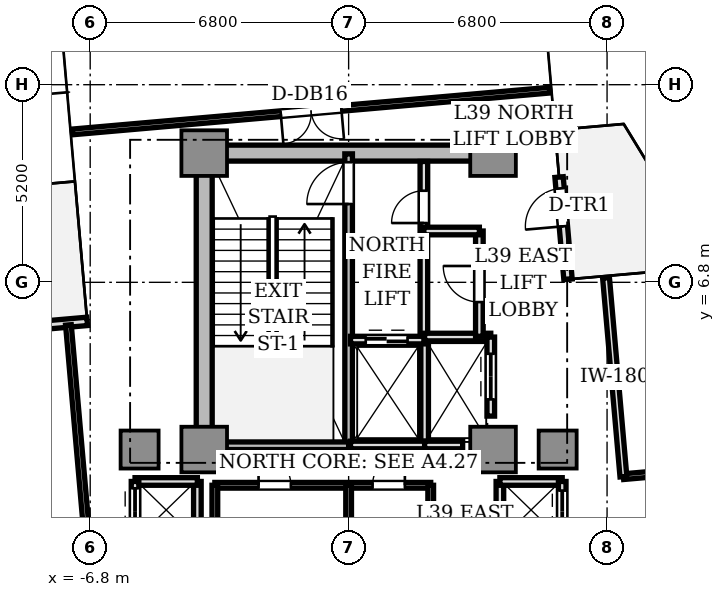
"""IFC4 building model, lengths in metres.
Left out: names, types, materials, properties, quantities, classifications, styles, units other than length and angle.
Written with IfcOpenShell. Run it as: python <this file> out.ifc"""

import sys

from ifc_helpers import new_model, si_unit, direction, frame, frame_2d, origin, origin_2d, place, context, subcontext, project, spatial, rectangle, extrude, source, transform, mapped, element, fill, save


model = new_model("IFC4")
c1 = context("Model", 3, precision=1e-05, world=origin(), true_north=direction((0.0, 1.0)))
c2 = subcontext(c1, "Body", "Model", "MODEL_VIEW")
j1 = project(units=[si_unit("LENGTHUNIT", "METRE"), si_unit("PLANEANGLEUNIT", "RADIAN")], contexts=[c1])
p1 = place(None, origin())
s1 = spatial("IfcSite", under=j1, at=p1, CompositionType="ELEMENT")
p2 = place(p1, origin())
s2 = spatial("IfcBuilding", under=s1, at=p2, CompositionType="ELEMENT")
p3 = place(p2, frame((0.0, 0.0, 142.75)))
s3 = spatial("IfcBuildingStorey", under=s2, at=p3, CompositionType="ELEMENT", Elevation=142.75)
p4 = place(p3, frame((-3.55, 10.2, 0.0), z_axis=(0.0, 0.0, 1.0), x_axis=(1.0, 0.0, 0.0)))
e1 = element("IfcWall", 1, at=p4, inside=s3, PredefinedType="SHEAR", context=c2, shape_type="SweptSolid", body=[
    extrude(rectangle(XDim=7.1, YDim=0.42, at=frame_2d((3.55, 0.0))), origin(), (0.0, 0.0, 1.0), 4.26),
])
p5 = place(p3, frame((-3.8, 2.85, 0.0), z_axis=(0.0, 0.0, 1.0), x_axis=(0.0, 1.0, 0.0)))
e2 = element("IfcWall", 2, at=p5, inside=s3, PredefinedType="SHEAR", context=c2, shape_type="SweptSolid", body=[
    extrude(rectangle(XDim=6.9, YDim=0.42, at=frame_2d((3.45, 0.0))), origin(), (0.0, 0.0, 1.0), 4.26),
])
m1 = source(origin(), c2, "Body", "SweptSolid", [
    extrude(rectangle(XDim=1.2, YDim=1.2, at=origin_2d()), origin(), (0.0, 0.0, 1.0), 4.26),
])
for number, where, z_axis, x_axis in (
    (3, (-3.8, 2.4, 0.0), (0.0, 0.0, 1.0), (1.0, 0.0, 0.0)),
    (4, (3.8, 2.4, 0.0), (0.0, 0.0, 1.0), (1.0, 0.0, 0.0)),
    (5, (-3.8, 10.2, 0.0), (0.0, 0.0, 1.0), (1.0, 0.0, 0.0)),
    (6, (3.8, 10.2, 0.0), (0.0, 0.0, 1.0), (1.0, 0.0, 0.0)),
):
    element("IfcColumn", number, at=place(p3, frame(where, z_axis=z_axis, x_axis=x_axis)), inside=s3, PredefinedType="COLUMN", context=c2, shape_type="MappedRepresentation", body=[
        mapped(m1, transform((0.0, 0.0, 0.0), scale=1.0)),
    ])
m2 = source(origin(), c2, "Body", "SweptSolid", [
    extrude(rectangle(XDim=1.0, YDim=1.0, at=origin_2d()), origin(), (0.0, 0.0, 1.0), 4.26),
])
for number, where, z_axis, x_axis in (
    (7, (5.5, 2.4, 0.0), (0.0, 0.0, 1.0), (1.0, 0.0, 0.0)),
    (8, (-5.5, 2.4, 0.0), (0.0, 0.0, 1.0), (1.0, 0.0, 0.0)),
):
    element("IfcColumn", number, at=place(p3, frame(where, z_axis=z_axis, x_axis=x_axis)), inside=s3, PredefinedType="COLUMN", context=c2, shape_type="MappedRepresentation", body=[
        mapped(m2, transform((0.0, 0.0, 0.0), scale=1.0)),
    ])
p6 = place(p3, frame((5.772, 6.879, 0.0), z_axis=(0.0, 0.0, 1.0), x_axis=(-0.087168071984, 0.996193619346, 0.0)))
e9 = element("IfcWall", 9, at=p6, inside=s3, PredefinedType="STANDARD", context=c2, shape_type="SweptSolid", body=[
    extrude(rectangle(XDim=2.7, YDim=0.22, at=frame_2d((1.35, 0.0))), origin(), (0.0, 0.0, 1.0), 4.26),
])
p7 = place(p6, frame((1.4, 0.0, 0.0)))
e10 = element("IfcOpeningElement", 10, at=p7, cuts=e9, PredefinedType="OPENING", context=c2, shape_type="SweptSolid", body=[
    extrude(rectangle(XDim=1.0, YDim=2.2, at=frame_2d((0.5, 1.1))), frame((0.0, 0.12, 0.0), z_axis=(0.0, -1.0, 0.0), x_axis=(1.0, 0.0, 0.0)), (0.0, 0.0, 1.0), 0.24),
])
p8 = place(p3, frame((-6.879, 5.772, 0.0), z_axis=(0.0, 0.0, 1.0), x_axis=(-0.996193619346, -0.087168071984, 0.0)))
e11 = element("IfcWall", 11, at=p8, inside=s3, PredefinedType="STANDARD", context=c2, shape_type="SweptSolid", body=[
    extrude(rectangle(XDim=2.7, YDim=0.22, at=frame_2d((1.35, 0.0))), origin(), (0.0, 0.0, 1.0), 4.26),
])
p9 = place(p8, frame((1.4, 0.0, 0.0)))
e12 = element("IfcOpeningElement", 12, at=p9, cuts=e11, PredefinedType="OPENING", context=c2, shape_type="SweptSolid", body=[
    extrude(rectangle(XDim=1.0, YDim=2.2, at=frame_2d((0.5, 1.1))), frame((0.0, 0.12, 0.0), z_axis=(0.0, -1.0, 0.0), x_axis=(1.0, 0.0, 0.0)), (0.0, 0.0, 1.0), 0.24),
])
p10 = place(p3, frame((0.0, 2.5, 0.0), z_axis=(0.0, 0.0, 1.0), x_axis=(0.0, 1.0, 0.0)))
e13 = element("IfcWall", 13, at=p10, inside=s3, PredefinedType="SOLIDWALL", context=c2, shape_type="SweptSolid", body=[
    extrude(rectangle(XDim=7.68, YDim=0.2, at=frame_2d((3.84, 0.0))), origin(), (0.0, 0.0, 1.0), 4.26),
])
p11 = place(p10, frame((6.36, 0.0, 0.0)))
e14 = element("IfcOpeningElement", 14, at=p11, cuts=e13, PredefinedType="OPENING", context=c2, shape_type="SweptSolid", body=[
    extrude(rectangle(XDim=1.1, YDim=2.15, at=frame_2d((0.55, 1.075))), frame((0.0, 0.11, 0.0), z_axis=(0.0, -1.0, 0.0), x_axis=(1.0, 0.0, 0.0)), (0.0, 0.0, 1.0), 0.22),
])
p12 = place(p3, frame((-3.72, 2.5, 0.0), z_axis=(0.0, 0.0, 1.0), x_axis=(1.0, 0.0, 0.0)))
e15 = element("IfcWall", 15, at=p12, inside=s3, PredefinedType="SOLIDWALL", context=c2, shape_type="SweptSolid", body=[
    extrude(rectangle(XDim=3.72, YDim=0.2, at=frame_2d((1.86, 0.0))), origin(), (0.0, 0.0, 1.0), 4.26),
])
p13 = place(p3, frame((1.98, 5.32, 0.0), z_axis=(0.0, 0.0, 1.0), x_axis=(0.0, 1.0, 0.0)))
e16 = element("IfcWall", 16, at=p13, inside=s3, PredefinedType="SOLIDWALL", context=c2, shape_type="SweptSolid", body=[
    extrude(rectangle(XDim=4.66, YDim=0.2, at=frame_2d((2.33, 0.0))), origin(), (0.0, 0.0, 1.0), 3.81),
])
p14 = place(p13, frame((3.04, 0.0, 0.0)))
e17 = element("IfcOpeningElement", 17, at=p14, cuts=e16, PredefinedType="OPENING", context=c2, shape_type="SweptSolid", body=[
    extrude(rectangle(XDim=0.85, YDim=2.1, at=frame_2d((0.425, 1.05))), frame((0.0, 0.11, 0.0), z_axis=(0.0, -1.0, 0.0), x_axis=(1.0, 0.0, 0.0)), (0.0, 0.0, 1.0), 0.22),
])
p15 = place(p3, frame((2.0, 2.5, 0.0), z_axis=(0.0, 0.0, 1.0), x_axis=(0.0, 1.0, 0.0)))
e18 = element("IfcWall", 18, at=p15, inside=s3, PredefinedType="SOLIDWALL", context=c2, shape_type="SweptSolid", body=[
    extrude(rectangle(XDim=2.78, YDim=0.2, at=frame_2d((1.39, 0.0))), origin(), (0.0, 0.0, 1.0), 3.81),
])
p16 = place(p3, frame((0.05, 2.52, 0.0), z_axis=(0.0, 0.0, 1.0), x_axis=(1.0, 0.0, 0.0)))
e19 = element("IfcWall", 19, at=p16, inside=s3, PredefinedType="SOLIDWALL", context=c2, shape_type="SweptSolid", body=[
    extrude(rectangle(XDim=1.95, YDim=0.2, at=frame_2d((0.975, 0.0))), origin(), (0.0, 0.0, 1.0), 3.81),
])
p17 = place(p3, frame((0.05, 5.28, 0.0), z_axis=(0.0, 0.0, 1.0), x_axis=(1.0, 0.0, 0.0)))
e20 = element("IfcWall", 20, at=p17, inside=s3, PredefinedType="SOLIDWALL", context=c2, shape_type="SweptSolid", body=[
    extrude(rectangle(XDim=1.93, YDim=0.2, at=frame_2d((0.965, 0.0))), origin(), (0.0, 0.0, 1.0), 3.81),
])
p18 = place(p17, frame((0.4, 0.0, 0.0)))
e21 = element("IfcOpeningElement", 21, at=p18, cuts=e20, PredefinedType="OPENING", context=c2, shape_type="SweptSolid", body=[
    extrude(rectangle(XDim=1.1, YDim=2.2, at=frame_2d((0.55, 1.1))), frame((0.0, 0.11, 0.0), z_axis=(0.0, -1.0, 0.0), x_axis=(1.0, 0.0, 0.0)), (0.0, 0.0, 1.0), 0.22),
])
p19 = place(p3, frame((2.0, 2.52, 0.0), z_axis=(0.0, 0.0, 1.0), x_axis=(1.0, 0.0, 0.0)))
e22 = element("IfcWall", 22, at=p19, inside=s3, PredefinedType="SOLIDWALL", context=c2, shape_type="SweptSolid", body=[
    extrude(rectangle(XDim=1.0, YDim=0.2, at=frame_2d((0.5, 0.0))), origin(), (0.0, 0.0, 1.0), 3.81),
])
p20 = place(p3, frame((2.0, 5.36, 0.0), z_axis=(0.0, 0.0, 1.0), x_axis=(1.0, 0.0, 0.0)))
e23 = element("IfcWall", 23, at=p20, inside=s3, PredefinedType="SOLIDWALL", context=c2, shape_type="SweptSolid", body=[
    extrude(rectangle(XDim=1.74, YDim=0.2, at=frame_2d((0.87, 0.0))), origin(), (0.0, 0.0, 1.0), 3.81),
])
p21 = place(p3, frame((3.74, 3.28, 0.0), z_axis=(0.0, 0.0, 1.0), x_axis=(0.0, 1.0, 0.0)))
e24 = element("IfcWall", 24, at=p21, inside=s3, PredefinedType="SOLIDWALL", context=c2, shape_type="SweptSolid", body=[
    extrude(rectangle(XDim=2.08, YDim=0.2, at=frame_2d((1.04, 0.0))), origin(), (0.0, 0.0, 1.0), 3.81),
])
p22 = place(p21, frame((0.44, 0.0, 0.0)))
e25 = element("IfcOpeningElement", 25, at=p22, cuts=e24, PredefinedType="OPENING", context=c2, shape_type="SweptSolid", body=[
    extrude(rectangle(XDim=1.2, YDim=2.2, at=frame_2d((0.6, 1.1))), frame((0.0, 0.11, 0.0), z_axis=(0.0, -1.0, 0.0), x_axis=(1.0, 0.0, 0.0)), (0.0, 0.0, 1.0), 0.22),
])
p23 = place(p3, frame((3.98, -1.56, 0.0), z_axis=(0.0, 0.0, 1.0), x_axis=(0.0, 1.0, 0.0)))
e26 = element("IfcWall", 26, at=p23, inside=s3, PredefinedType="SOLIDWALL", context=c2, shape_type="SweptSolid", body=[
    extrude(rectangle(XDim=3.12, YDim=0.2, at=frame_2d((1.56, 0.0))), origin(), (0.0, 0.0, 1.0), 3.43),
])
p24 = place(p3, frame((3.98, 1.56, 0.0), z_axis=(0.0, 0.0, 1.0), x_axis=(1.0, 0.0, 0.0)))
e27 = element("IfcWall", 27, at=p24, inside=s3, PredefinedType="SOLIDWALL", context=c2, shape_type="SweptSolid", body=[
    extrude(rectangle(XDim=1.64, YDim=0.2, at=frame_2d((0.82, 0.0))), origin(), (0.0, 0.0, 1.0), 3.81),
])
p25 = place(p3, frame((5.62, 0.0, 0.0), z_axis=(0.0, 0.0, 1.0), x_axis=(0.0, 1.0, 0.0)))
e28 = element("IfcWall", 28, at=p25, inside=s3, PredefinedType="SOLIDWALL", context=c2, shape_type="SweptSolid", body=[
    extrude(rectangle(XDim=1.56, YDim=0.2, at=frame_2d((0.78, 0.0))), origin(), (0.0, 0.0, 1.0), 3.81),
])
p26 = place(p25, frame((0.22, 0.0, 0.0)))
e29 = element("IfcOpeningElement", 29, at=p26, cuts=e28, PredefinedType="OPENING", context=c2, shape_type="SweptSolid", body=[
    extrude(rectangle(XDim=1.1, YDim=2.2, at=frame_2d((0.55, 1.1))), frame((0.0, 0.11, 0.0), z_axis=(0.0, -1.0, 0.0), x_axis=(1.0, 0.0, 0.0)), (0.0, 0.0, 1.0), 0.22),
])
p27 = place(p3, frame((-3.98, -1.56, 0.0), z_axis=(0.0, 0.0, 1.0), x_axis=(0.0, 1.0, 0.0)))
e30 = element("IfcWall", 30, at=p27, inside=s3, PredefinedType="SOLIDWALL", context=c2, shape_type="SweptSolid", body=[
    extrude(rectangle(XDim=3.12, YDim=0.2, at=frame_2d((1.56, 0.0))), origin(), (0.0, 0.0, 1.0), 3.43),
])
p28 = place(p3, frame((-5.62, 1.56, 0.0), z_axis=(0.0, 0.0, 1.0), x_axis=(1.0, 0.0, 0.0)))
e31 = element("IfcWall", 31, at=p28, inside=s3, PredefinedType="SOLIDWALL", context=c2, shape_type="SweptSolid", body=[
    extrude(rectangle(XDim=1.64, YDim=0.2, at=frame_2d((0.82, 0.0))), origin(), (0.0, 0.0, 1.0), 3.81),
])
p29 = place(p3, frame((-5.62, 0.0, 0.0), z_axis=(0.0, 0.0, 1.0), x_axis=(0.0, 1.0, 0.0)))
e32 = element("IfcWall", 32, at=p29, inside=s3, PredefinedType="SOLIDWALL", context=c2, shape_type="SweptSolid", body=[
    extrude(rectangle(XDim=1.56, YDim=0.2, at=frame_2d((0.78, 0.0))), origin(), (0.0, 0.0, 1.0), 3.81),
])
p30 = place(p29, frame((0.18, 0.0, 0.0)))
e33 = element("IfcOpeningElement", 33, at=p30, cuts=e32, PredefinedType="OPENING", context=c2, shape_type="SweptSolid", body=[
    extrude(rectangle(XDim=1.2, YDim=2.2, at=frame_2d((0.6, 1.1))), frame((0.0, 0.11, 0.0), z_axis=(0.0, -1.0, 0.0), x_axis=(1.0, 0.0, 0.0)), (0.0, 0.0, 1.0), 0.22),
])
p31 = place(p3, frame((3.44, 5.38, 0.0), z_axis=(0.0, 0.0, 1.0), x_axis=(0.0, 1.0, 0.0)))
e34 = element("IfcWall", 34, at=p31, inside=s3, PredefinedType="SOLIDWALL", context=c2, shape_type="SweptSolid", body=[
    extrude(rectangle(XDim=2.77, YDim=0.2, at=frame_2d((1.385, 0.0))), origin(), (0.0, 0.0, 1.0), 3.81),
])
p32 = place(p31, frame((0.9, 0.0, 0.0)))
e35 = element("IfcOpeningElement", 35, at=p32, cuts=e34, PredefinedType="OPENING", context=c2, shape_type="SweptSolid", body=[
    extrude(rectangle(XDim=0.95, YDim=2.15, at=frame_2d((0.475, 1.075))), frame((0.0, 0.11, 0.0), z_axis=(0.0, -1.0, 0.0), x_axis=(1.0, 0.0, 0.0)), (0.0, 0.0, 1.0), 0.22),
])
p33 = place(p3, frame((1.98, 8.15, 0.0), z_axis=(0.0, 0.0, 1.0), x_axis=(1.0, 0.0, 0.0)))
e36 = element("IfcWall", 36, at=p33, inside=s3, PredefinedType="SOLIDWALL", context=c2, shape_type="SweptSolid", body=[
    extrude(rectangle(XDim=1.46, YDim=0.2, at=frame_2d((0.73, 0.0))), origin(), (0.0, 0.0, 1.0), 3.81),
])
p34 = place(p3, frame((-3.52, 1.46, 0.0), z_axis=(0.0, 0.0, 1.0), x_axis=(1.0, 0.0, 0.0)))
e37 = element("IfcWall", 37, at=p34, inside=s3, PredefinedType="PARTITIONING", context=c2, shape_type="SweptSolid", body=[
    extrude(rectangle(XDim=5.68, YDim=0.15, at=frame_2d((2.84, 0.0))), origin(), (0.0, 0.0, 1.0), 3.81),
])
p35 = place(p34, frame((1.15, 0.0, 0.0)))
e38 = element("IfcOpeningElement", 38, at=p35, cuts=e37, PredefinedType="OPENING", context=c2, shape_type="SweptSolid", body=[
    extrude(rectangle(XDim=0.85, YDim=2.1, at=frame_2d((0.425, 1.05))), frame((0.0, 0.085, 0.0), z_axis=(0.0, -1.0, 0.0), x_axis=(1.0, 0.0, 0.0)), (0.0, 0.0, 1.0), 0.17),
])
p36 = place(p34, frame((4.15, 0.0, 0.0)))
e39 = element("IfcOpeningElement", 39, at=p36, cuts=e37, PredefinedType="OPENING", context=c2, shape_type="SweptSolid", body=[
    extrude(rectangle(XDim=0.85, YDim=2.1, at=frame_2d((0.425, 1.05))), frame((0.0, 0.085, 0.0), z_axis=(0.0, -1.0, 0.0), x_axis=(1.0, 0.0, 0.0)), (0.0, 0.0, 1.0), 0.17),
])
p37 = place(p3, frame((-3.52, 0.1, 0.0), z_axis=(0.0, 0.0, 1.0), x_axis=(0.0, 1.0, 0.0)))
e40 = element("IfcWall", 40, at=p37, inside=s3, PredefinedType="PARTITIONING", context=c2, shape_type="SweptSolid", body=[
    extrude(rectangle(XDim=1.36, YDim=0.15, at=frame_2d((0.68, 0.0))), origin(), (0.0, 0.0, 1.0), 3.43),
])
for number, where, z_axis, x_axis in (
    (41, (2.16, 0.1, 0.0), (0.0, 0.0, 1.0), (0.0, 1.0, 0.0)),
    (42, (0.0, 0.1, 0.0), (0.0, 0.0, 1.0), (0.0, 1.0, 0.0)),
):
    element("IfcWall", number, at=place(p3, frame(where, z_axis=z_axis, x_axis=x_axis)), inside=s3, PredefinedType="PARTITIONING", context=c2, shape_type="SweptSolid", body=[
        extrude(rectangle(XDim=1.36, YDim=0.15, at=frame_2d((0.68, 0.0))), origin(), (0.0, 0.0, 1.0), 3.81),
    ])
p38 = place(p3, frame((7.23, 1.687, 0.0), z_axis=(0.0, 0.0, 1.0), x_axis=(0.996194280863, 0.087160511558, 0.0)))
e43 = element("IfcWall", 43, at=p38, inside=s3, PredefinedType="PARTITIONING", context=c2, shape_type="SweptSolid", body=[
    extrude(rectangle(XDim=12.7, YDim=0.15, at=frame_2d((6.35, 0.0))), origin(), (0.0, 0.0, 1.0), 3.81),
])
p39 = place(p38, frame((4.65, 0.0, 0.0)))
e44 = element("IfcOpeningElement", 44, at=p39, cuts=e43, PredefinedType="OPENING", context=c2, shape_type="SweptSolid", body=[
    extrude(rectangle(XDim=0.85, YDim=2.1, at=frame_2d((0.425, 1.05))), frame((0.0, 0.085, 0.0), z_axis=(0.0, -1.0, 0.0), x_axis=(1.0, 0.0, 0.0)), (0.0, 0.0, 1.0), 0.17),
])
p40 = place(p3, frame((7.414, -0.406, 0.0), z_axis=(0.0, 0.0, 1.0), x_axis=(0.996194280863, 0.087160511558, 0.0)))
e45 = element("IfcWall", 45, at=p40, inside=s3, PredefinedType="PARTITIONING", context=c2, shape_type="SweptSolid", body=[
    extrude(rectangle(XDim=12.7, YDim=0.15, at=frame_2d((6.35, 0.0))), origin(), (0.0, 0.0, 1.0), 3.81),
])
p41 = place(p40, frame((0.725, 0.0, 0.0)))
e46 = element("IfcOpeningElement", 46, at=p41, cuts=e45, PredefinedType="OPENING", context=c2, shape_type="SweptSolid", body=[
    extrude(rectangle(XDim=0.95, YDim=2.15, at=frame_2d((0.475, 1.075))), frame((0.0, 0.085, 0.0), z_axis=(0.0, -1.0, 0.0), x_axis=(1.0, 0.0, 0.0)), (0.0, 0.0, 1.0), 0.17),
])
p42 = place(p40, frame((7.075, 0.0, 0.0)))
e47 = element("IfcOpeningElement", 47, at=p42, cuts=e45, PredefinedType="OPENING", context=c2, shape_type="SweptSolid", body=[
    extrude(rectangle(XDim=0.85, YDim=2.1, at=frame_2d((0.425, 1.05))), frame((0.0, 0.085, 0.0), z_axis=(0.0, -1.0, 0.0), x_axis=(1.0, 0.0, 0.0)), (0.0, 0.0, 1.0), 0.17),
])
p43 = place(p3, frame((7.23, 1.687, 0.0), z_axis=(0.0, 0.0, 1.0), x_axis=(-0.087147336495, 0.996195433508, 0.0)))
e48 = element("IfcWall", 48, at=p43, inside=s3, PredefinedType="PARTITIONING", context=c2, shape_type="SweptSolid", body=[
    extrude(rectangle(XDim=5.25, YDim=0.18, at=frame_2d((2.625, 0.0))), origin(), (0.0, 0.0, 1.0), 3.81),
])
p44 = place(p3, frame((5.287, 11.856, 0.0), z_axis=(0.0, 0.0, 1.0), x_axis=(-0.996194790044, -0.087154691724, 0.0)))
e49 = element("IfcWall", 49, at=p44, inside=s3, PredefinedType="PARTITIONING", context=c2, shape_type="SweptSolid", body=[
    extrude(rectangle(XDim=12.6, YDim=0.15, at=frame_2d((6.3, 0.0))), origin(), (0.0, 0.0, 1.0), 3.81),
])
p45 = place(p44, frame((5.5, 0.0, 0.0)))
e50 = element("IfcOpeningElement", 50, at=p45, cuts=e49, PredefinedType="OPENING", context=c2, shape_type="SweptSolid", body=[
    extrude(rectangle(XDim=1.6, YDim=2.25, at=frame_2d((0.8, 1.125))), frame((0.0, 0.085, 0.0), z_axis=(0.0, -1.0, 0.0), x_axis=(1.0, 0.0, 0.0)), (0.0, 0.0, 1.0), 0.17),
])
p46 = place(p3, frame((-7.373, 5.679, 0.0), z_axis=(0.0, 0.0, 1.0), x_axis=(0.087154691724, -0.996194790044, 0.0)))
e51 = element("IfcWall", 51, at=p46, inside=s3, PredefinedType="PARTITIONING", context=c2, shape_type="SweptSolid", body=[
    extrude(rectangle(XDim=12.6, YDim=0.15, at=frame_2d((6.3, 0.0))), origin(), (0.0, 0.0, 1.0), 3.81),
])
p47 = place(p46, frame((5.5, 0.0, 0.0)))
e52 = element("IfcOpeningElement", 52, at=p47, cuts=e51, PredefinedType="OPENING", context=c2, shape_type="SweptSolid", body=[
    extrude(rectangle(XDim=1.6, YDim=2.25, at=frame_2d((0.8, 1.125))), frame((0.0, 0.085, 0.0), z_axis=(0.0, -1.0, 0.0), x_axis=(1.0, 0.0, 0.0)), (0.0, 0.0, 1.0), 0.17),
])
m3 = source(origin(), c2, "Body", "SweptSolid", [
    extrude(rectangle(XDim=1.0, YDim=0.05, at=origin_2d()), origin(), (0.0, 0.0, 1.0), 2.2),
])
p48 = place(p7, frame((0.5, 0.0, 0.0)))
e53 = element("IfcDoor", 53, at=p48, inside=s3, OperationType="SINGLE_SWING_LEFT", PredefinedType="DOOR", context=c2, shape_type="MappedRepresentation", body=[
    mapped(m3, transform((0.0, 0.0, 0.0), scale=1.0)),
])
fill(e10, e53)
m4 = source(origin(), c2, "Body", "SweptSolid", [
    extrude(rectangle(XDim=1.1, YDim=0.05, at=origin_2d()), origin(), (0.0, 0.0, 1.0), 2.15),
])
p49 = place(p11, frame((0.55, 0.0, 0.0)))
e54 = element("IfcDoor", 54, at=p49, inside=s3, OperationType="SINGLE_SWING_LEFT", PredefinedType="DOOR", context=c2, shape_type="MappedRepresentation", body=[
    mapped(m4, transform((0.0, 0.0, 0.0), scale=1.0)),
])
fill(e14, e54)
m5 = source(origin(), c2, "Body", "SweptSolid", [
    extrude(rectangle(XDim=0.85, YDim=0.05, at=origin_2d()), origin(), (0.0, 0.0, 1.0), 2.1),
])
p50 = place(p14, frame((0.425, 0.0, 0.0)))
e55 = element("IfcDoor", 55, at=p50, inside=s3, OperationType="SINGLE_SWING_LEFT", PredefinedType="DOOR", context=c2, shape_type="MappedRepresentation", body=[
    mapped(m5, transform((0.0, 0.0, 0.0), scale=1.0)),
])
fill(e17, e55)
m6 = source(origin(), c2, "Body", "SweptSolid", [
    extrude(rectangle(XDim=1.1, YDim=0.05, at=origin_2d()), origin(), (0.0, 0.0, 1.0), 2.2),
])
p51 = place(p18, frame((0.55, 0.0, 0.0)))
e56 = element("IfcDoor", 56, at=p51, inside=s3, OperationType="DOUBLE_DOOR_SLIDING", PredefinedType="DOOR", context=c2, shape_type="MappedRepresentation", body=[
    mapped(m6, transform((0.0, 0.0, 0.0), scale=1.0)),
])
fill(e21, e56)
m7 = source(origin(), c2, "Body", "SweptSolid", [
    extrude(rectangle(XDim=1.2, YDim=0.05, at=origin_2d()), origin(), (0.0, 0.0, 1.0), 2.2),
])
p52 = place(p22, frame((0.6, 0.0, 0.0)))
e57 = element("IfcDoor", 57, at=p52, inside=s3, OperationType="DOUBLE_DOOR_SLIDING", PredefinedType="DOOR", context=c2, shape_type="MappedRepresentation", body=[
    mapped(m7, transform((0.0, 0.0, 0.0), scale=1.0)),
])
fill(e25, e57)
p53 = place(p26, frame((0.55, 0.0, 0.0)))
e58 = element("IfcDoor", 58, at=p53, inside=s3, OperationType="DOUBLE_DOOR_SLIDING", PredefinedType="DOOR", context=c2, shape_type="MappedRepresentation", body=[
    mapped(m6, transform((0.0, 0.0, 0.0), scale=1.0)),
])
fill(e29, e58)
p54 = place(p30, frame((0.6, 0.0, 0.0)))
e59 = element("IfcDoor", 59, at=p54, inside=s3, OperationType="DOUBLE_DOOR_SLIDING", PredefinedType="DOOR", context=c2, shape_type="MappedRepresentation", body=[
    mapped(m7, transform((0.0, 0.0, 0.0), scale=1.0)),
])
fill(e33, e59)
m8 = source(origin(), c2, "Body", "SweptSolid", [
    extrude(rectangle(XDim=0.95, YDim=0.05, at=origin_2d()), origin(), (0.0, 0.0, 1.0), 2.15),
])
p55 = place(p32, frame((0.475, 0.0, 0.0)))
e60 = element("IfcDoor", 60, at=p55, inside=s3, OperationType="SINGLE_SWING_RIGHT", PredefinedType="DOOR", context=c2, shape_type="MappedRepresentation", body=[
    mapped(m8, transform((0.0, 0.0, 0.0), scale=1.0)),
])
fill(e35, e60)
p56 = place(p35, frame((0.425, 0.0, 0.0)))
e61 = element("IfcDoor", 61, at=p56, inside=s3, OperationType="SINGLE_SWING_LEFT", PredefinedType="DOOR", context=c2, shape_type="MappedRepresentation", body=[
    mapped(m5, transform((0.0, 0.0, 0.0), scale=1.0)),
])
fill(e38, e61)
p57 = place(p36, frame((0.425, 0.0, 0.0)))
e62 = element("IfcDoor", 62, at=p57, inside=s3, OperationType="SINGLE_SWING_RIGHT", PredefinedType="DOOR", context=c2, shape_type="MappedRepresentation", body=[
    mapped(m5, transform((0.0, 0.0, 0.0), scale=1.0)),
])
fill(e39, e62)
m9 = source(origin(), c2, "Body", "SweptSolid", [
    extrude(rectangle(XDim=1.6, YDim=0.05, at=origin_2d()), origin(), (0.0, 0.0, 1.0), 2.25),
])
p58 = place(p45, frame((0.8, 0.0, 0.0)))
e63 = element("IfcDoor", 63, at=p58, inside=s3, OperationType="DOUBLE_DOOR_SINGLE_SWING", PredefinedType="DOOR", context=c2, shape_type="MappedRepresentation", body=[
    mapped(m9, transform((0.0, 0.0, 0.0), scale=1.0)),
])
fill(e50, e63)
save(model, sys.argv[1])
